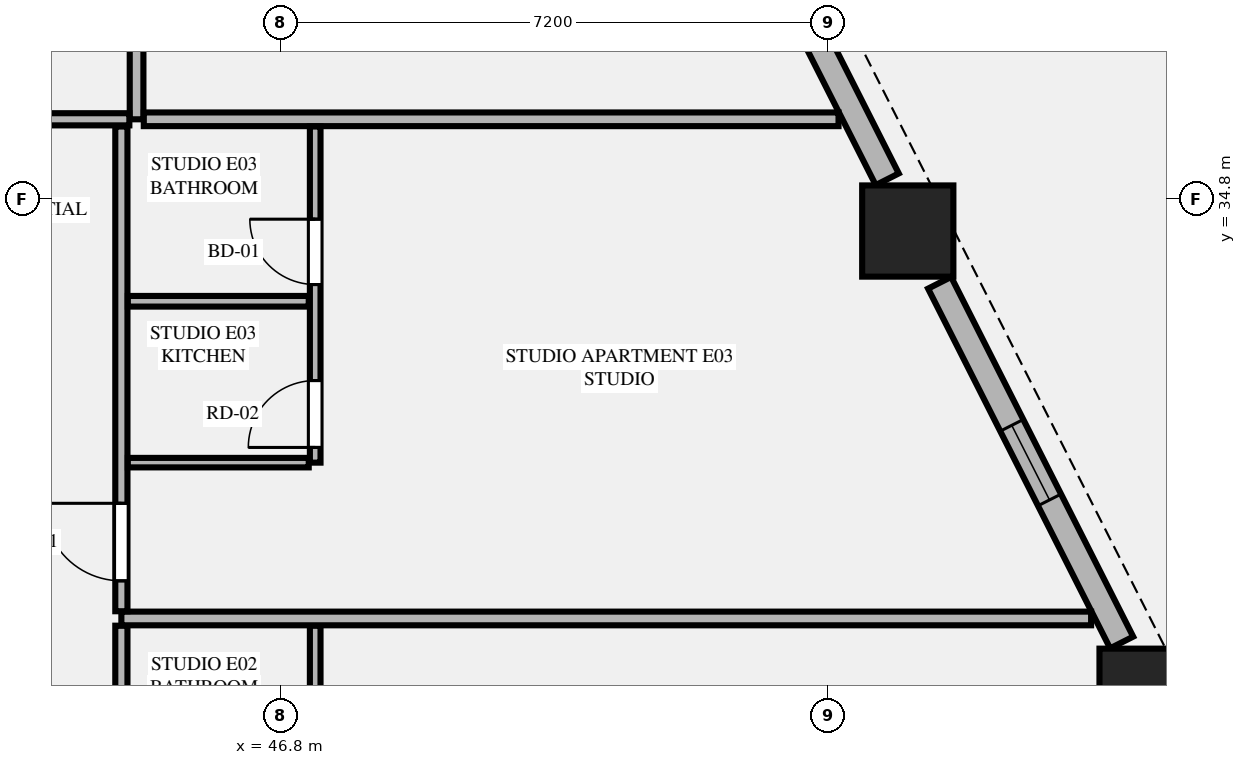
"""IFC4 building model, lengths in metres.
Left out: names, types, materials, properties, quantities, classifications, styles, units other than length and angle.
Written with IfcOpenShell. Run it as: python <this file> out.ifc"""

import sys

from ifc_helpers import new_model, si_unit, direction, frame, frame_2d, origin, origin_2d, place, context, subcontext, project, spatial, rectangle, extrude, element, fill, save


model = new_model("IFC4")
c1 = context("Model", 3, precision=1e-05, world=origin(), true_north=direction((0.0, 1.0)))
c2 = subcontext(c1, "Body", "Model", "MODEL_VIEW")
j1 = project(units=[si_unit("LENGTHUNIT", "METRE"), si_unit("PLANEANGLEUNIT", "RADIAN")], contexts=[c1])
p1 = place(None, origin())
s1 = spatial("IfcSite", under=j1, at=p1, CompositionType="ELEMENT")
p2 = place(p1, origin())
s2 = spatial("IfcBuilding", under=s1, at=p2, CompositionType="ELEMENT")
p3 = place(p2, frame((0.0, 0.0, 24.9)))
s3 = spatial("IfcBuildingStorey", under=s2, at=p3, CompositionType="ELEMENT", Elevation=24.9)
for number, where, z_axis, x_axis in (
    (1, (58.168, 28.286, 0.0), (0.0, 0.0, 1.0), (1.0, 0.0, 0.0)),
    (2, (55.046, 34.38, 0.0), (0.0, 0.0, 1.0), (1.0, 0.0, 0.0)),
):
    element("IfcColumn", number, at=place(p3, frame(where, z_axis=z_axis, x_axis=x_axis)), inside=s3, PredefinedType="COLUMN", context=c2, shape_type="SweptSolid", body=[
        extrude(rectangle(XDim=1.2, YDim=1.2, at=origin_2d()), origin(), (0.0, 0.0, 1.0), 3.55),
    ])
p4 = place(p3, frame((57.86, 28.967, 0.0), z_axis=(0.0, 0.0, 1.0), x_axis=(-0.451590635984, 0.892225250422, 0.0)))
e3 = element("IfcWall", 3, at=p4, inside=s3, PredefinedType="STANDARD", context=c2, shape_type="SweptSolid", body=[
    extrude(rectangle(XDim=5.303, YDim=0.34, at=frame_2d((2.652, 0.0))), origin(), (0.0, 0.0, 1.0), 2.787),
])
p5 = place(p4, frame((2.102, 0.0, 0.75)))
e4 = element("IfcOpeningElement", 4, at=p5, cuts=e3, PredefinedType="OPENING", context=c2, shape_type="SweptSolid", body=[
    extrude(rectangle(XDim=1.1, YDim=1.887, at=frame_2d((0.55, 0.943))), frame((0.0, 0.18, 0.0), z_axis=(0.0, -1.0, 0.0), x_axis=(1.0, 0.0, 0.0)), (0.0, 0.0, 1.0), 0.36),
])
p6 = place(p3, frame((54.776, 35.061, 0.0), z_axis=(0.0, 0.0, 1.0), x_axis=(-0.451592100298, 0.892224509273, 0.0)))
e5 = element("IfcWall", 5, at=p6, inside=s3, PredefinedType="STANDARD", context=c2, shape_type="SweptSolid", body=[
    extrude(rectangle(XDim=5.547, YDim=0.34, at=frame_2d((2.773, 0.0))), origin(), (0.0, 0.0, 1.0), 2.787),
])
p7 = place(p6, frame((2.591, 0.0, 0.0)))
e6 = element("IfcOpeningElement", 6, at=p7, cuts=e5, PredefinedType="OPENING", context=c2, shape_type="SweptSolid", body=[
    extrude(rectangle(XDim=1.5, YDim=2.3, at=frame_2d((0.75, 1.15))), frame((0.0, 0.18, 0.0), z_axis=(0.0, -1.0, 0.0), x_axis=(1.0, 0.0, 0.0)), (0.0, 0.0, 1.0), 0.36),
])
p8 = place(p3, frame((44.9, 35.85, 0.0), z_axis=(0.0, 0.0, 1.0), x_axis=(0.0, 1.0, 0.0)))
e7 = element("IfcWall", 7, at=p8, inside=s3, PredefinedType="PARTITIONING", context=c2, shape_type="SweptSolid", body=[
    extrude(rectangle(XDim=13.295, YDim=0.18, at=frame_2d((6.647, 0.0))), origin(), (0.0, 0.0, 1.0), 3.33),
])
p9 = place(p3, frame((36.617, 35.85, 0.0), z_axis=(0.0, 0.0, 1.0), x_axis=(1.0, 0.0, 0.0)))
e8 = element("IfcWall", 8, at=p9, inside=s3, PredefinedType="PARTITIONING", context=c2, shape_type="SweptSolid", body=[
    extrude(rectangle(XDim=8.188, YDim=0.16, at=frame_2d((4.094, 0.0))), origin(), (0.0, 0.0, 1.0), 3.33),
])
p10 = place(p9, frame((0.355, 0.0, 0.0)))
e9 = element("IfcOpeningElement", 9, at=p10, cuts=e8, PredefinedType="OPENING", context=c2, shape_type="SweptSolid", body=[
    extrude(rectangle(XDim=1.02, YDim=2.25, at=frame_2d((0.51, 1.125))), frame((0.0, 0.09, 0.0), z_axis=(0.0, -1.0, 0.0), x_axis=(1.0, 0.0, 0.0)), (0.0, 0.0, 1.0), 0.18),
])
p11 = place(p3, frame((44.995, 35.85, 0.0), z_axis=(0.0, 0.0, 1.0), x_axis=(1.0, 0.0, 0.0)))
e10 = element("IfcWall", 10, at=p11, inside=s3, PredefinedType="PARTITIONING", context=c2, shape_type="SweptSolid", body=[
    extrude(rectangle(XDim=9.14, YDim=0.18, at=frame_2d((4.57, 0.0))), origin(), (0.0, 0.0, 1.0), 3.33),
])
p12 = place(p3, frame((44.7, 22.811, 0.0), z_axis=(0.0, 0.0, 1.0), x_axis=(0.0, 1.0, 0.0)))
e11 = element("IfcWall", 11, at=p12, inside=s3, PredefinedType="PARTITIONING", context=c2, shape_type="SweptSolid", body=[
    extrude(rectangle(XDim=6.377, YDim=0.16, at=frame_2d((3.188, 0.0))), origin(), (0.0, 0.0, 1.0), 3.33),
])
p13 = place(p12, frame((0.4, 0.0, 0.0)))
e12 = element("IfcOpeningElement", 12, at=p13, cuts=e11, PredefinedType="OPENING", context=c2, shape_type="SweptSolid", body=[
    extrude(rectangle(XDim=1.02, YDim=2.25, at=frame_2d((0.51, 1.125))), frame((0.0, 0.09, 0.0), z_axis=(0.0, -1.0, 0.0), x_axis=(1.0, 0.0, 0.0)), (0.0, 0.0, 1.0), 0.18),
])
p14 = place(p3, frame((47.25, 24.766, 0.0), z_axis=(0.0, 0.0, 1.0), x_axis=(0.0, 1.0, 0.0)))
e13 = element("IfcWall", 13, at=p14, inside=s3, PredefinedType="PLUMBINGWALL", context=c2, shape_type="SweptSolid", body=[
    extrude(rectangle(XDim=4.422, YDim=0.14, at=frame_2d((2.211, 0.0))), origin(), (0.0, 0.0, 1.0), 3.33),
])
p15 = place(p14, frame((2.343, 0.0, 0.0)))
e14 = element("IfcOpeningElement", 14, at=p15, cuts=e13, PredefinedType="OPENING", context=c2, shape_type="SweptSolid", body=[
    extrude(rectangle(XDim=0.86, YDim=2.1, at=frame_2d((0.43, 1.05))), frame((0.0, 0.08, 0.0), z_axis=(0.0, -1.0, 0.0), x_axis=(1.0, 0.0, 0.0)), (0.0, 0.0, 1.0), 0.16),
])
p16 = place(p14, frame((0.2, 0.0, 0.0)))
e15 = element("IfcOpeningElement", 15, at=p16, cuts=e13, PredefinedType="OPENING", context=c2, shape_type="SweptSolid", body=[
    extrude(rectangle(XDim=0.88, YDim=2.15, at=frame_2d((0.44, 1.075))), frame((0.0, 0.08, 0.0), z_axis=(0.0, -1.0, 0.0), x_axis=(1.0, 0.0, 0.0)), (0.0, 0.0, 1.0), 0.16),
])
p17 = place(p3, frame((44.7, 29.283, 0.0), z_axis=(0.0, 0.0, 1.0), x_axis=(1.0, 0.0, 0.0)))
e16 = element("IfcWall", 16, at=p17, inside=s3, PredefinedType="PARTITIONING", context=c2, shape_type="SweptSolid", body=[
    extrude(rectangle(XDim=12.758, YDim=0.18, at=frame_2d((6.379, 0.0))), origin(), (0.0, 0.0, 1.0), 3.33),
])
p18 = place(p3, frame((44.7, 29.378, 0.0), z_axis=(0.0, 0.0, 1.0), x_axis=(0.0, 1.0, 0.0)))
e17 = element("IfcWall", 17, at=p18, inside=s3, PredefinedType="PARTITIONING", context=c2, shape_type="SweptSolid", body=[
    extrude(rectangle(XDim=6.377, YDim=0.16, at=frame_2d((3.188, 0.0))), origin(), (0.0, 0.0, 1.0), 3.33),
])
p19 = place(p18, frame((0.4, 0.0, 0.0)))
e18 = element("IfcOpeningElement", 18, at=p19, cuts=e17, PredefinedType="OPENING", context=c2, shape_type="SweptSolid", body=[
    extrude(rectangle(XDim=1.02, YDim=2.25, at=frame_2d((0.51, 1.125))), frame((0.0, 0.09, 0.0), z_axis=(0.0, -1.0, 0.0), x_axis=(1.0, 0.0, 0.0)), (0.0, 0.0, 1.0), 0.18),
])
p20 = place(p3, frame((44.785, 31.333, 0.0), z_axis=(0.0, 0.0, 1.0), x_axis=(1.0, 0.0, 0.0)))
e19 = element("IfcWall", 19, at=p20, inside=s3, PredefinedType="PARTITIONING", context=c2, shape_type="SweptSolid", body=[
    extrude(rectangle(XDim=2.38, YDim=0.125, at=frame_2d((1.19, 0.0))), origin(), (0.0, 0.0, 1.0), 3.33),
])
p21 = place(p3, frame((47.25, 31.333, 0.0), z_axis=(0.0, 0.0, 1.0), x_axis=(0.0, 1.0, 0.0)))
e20 = element("IfcWall", 20, at=p21, inside=s3, PredefinedType="PLUMBINGWALL", context=c2, shape_type="SweptSolid", body=[
    extrude(rectangle(XDim=4.422, YDim=0.14, at=frame_2d((2.211, 0.0))), origin(), (0.0, 0.0, 1.0), 3.33),
])
p22 = place(p21, frame((2.343, 0.0, 0.0)))
e21 = element("IfcOpeningElement", 21, at=p22, cuts=e20, PredefinedType="OPENING", context=c2, shape_type="SweptSolid", body=[
    extrude(rectangle(XDim=0.86, YDim=2.1, at=frame_2d((0.43, 1.05))), frame((0.0, 0.08, 0.0), z_axis=(0.0, -1.0, 0.0), x_axis=(1.0, 0.0, 0.0)), (0.0, 0.0, 1.0), 0.16),
])
p23 = place(p21, frame((0.2, 0.0, 0.0)))
e22 = element("IfcOpeningElement", 22, at=p23, cuts=e20, PredefinedType="OPENING", context=c2, shape_type="SweptSolid", body=[
    extrude(rectangle(XDim=0.88, YDim=2.15, at=frame_2d((0.44, 1.075))), frame((0.0, 0.08, 0.0), z_axis=(0.0, -1.0, 0.0), x_axis=(1.0, 0.0, 0.0)), (0.0, 0.0, 1.0), 0.16),
])
p24 = place(p3, frame((44.785, 33.456, 0.0), z_axis=(0.0, 0.0, 1.0), x_axis=(1.0, 0.0, 0.0)))
e23 = element("IfcWall", 23, at=p24, inside=s3, PredefinedType="PLUMBINGWALL", context=c2, shape_type="SweptSolid", body=[
    extrude(rectangle(XDim=2.38, YDim=0.14, at=frame_2d((1.19, 0.0))), origin(), (0.0, 0.0, 1.0), 2.637),
])
p25 = place(p5, origin())
e24 = element("IfcWindow", 24, at=p25, inside=s3, PartitioningType="SINGLE_PANEL", PredefinedType="WINDOW", context=c2, shape_type="SweptSolid", body=[
    extrude(rectangle(XDim=1.1, YDim=1.887, at=frame_2d((0.55, 0.943))), frame((0.0, 0.03, 0.0), z_axis=(0.0, -1.0, 0.0), x_axis=(1.0, 0.0, 0.0)), (0.0, 0.0, 1.0), 0.06),
])
fill(e4, e24)
p26 = place(p22, origin())
e25 = element("IfcDoor", 25, at=p26, inside=s3, OperationType="SINGLE_SWING_RIGHT", PredefinedType="DOOR", context=c2, shape_type="SweptSolid", body=[
    extrude(rectangle(XDim=0.86, YDim=2.1, at=frame_2d((0.43, 1.05))), frame((0.0, 0.025, 0.0), z_axis=(0.0, -1.0, 0.0), x_axis=(1.0, 0.0, 0.0)), (0.0, 0.0, 1.0), 0.05),
])
fill(e21, e25)
p27 = place(p19, origin())
e26 = element("IfcDoor", 26, at=p27, inside=s3, OperationType="SINGLE_SWING_RIGHT", PredefinedType="DOOR", context=c2, shape_type="SweptSolid", body=[
    extrude(rectangle(XDim=1.02, YDim=2.25, at=frame_2d((0.51, 1.125))), frame((0.0, 0.025, 0.0), z_axis=(0.0, -1.0, 0.0), x_axis=(1.0, 0.0, 0.0)), (0.0, 0.0, 1.0), 0.05),
])
fill(e18, e26)
p28 = place(p23, origin())
e27 = element("IfcDoor", 27, at=p28, inside=s3, OperationType="SINGLE_SWING_LEFT", PredefinedType="DOOR", context=c2, shape_type="SweptSolid", body=[
    extrude(rectangle(XDim=0.88, YDim=2.15, at=frame_2d((0.44, 1.075))), frame((0.0, 0.025, 0.0), z_axis=(0.0, -1.0, 0.0), x_axis=(1.0, 0.0, 0.0)), (0.0, 0.0, 1.0), 0.05),
])
fill(e22, e27)
save(model, sys.argv[1])
